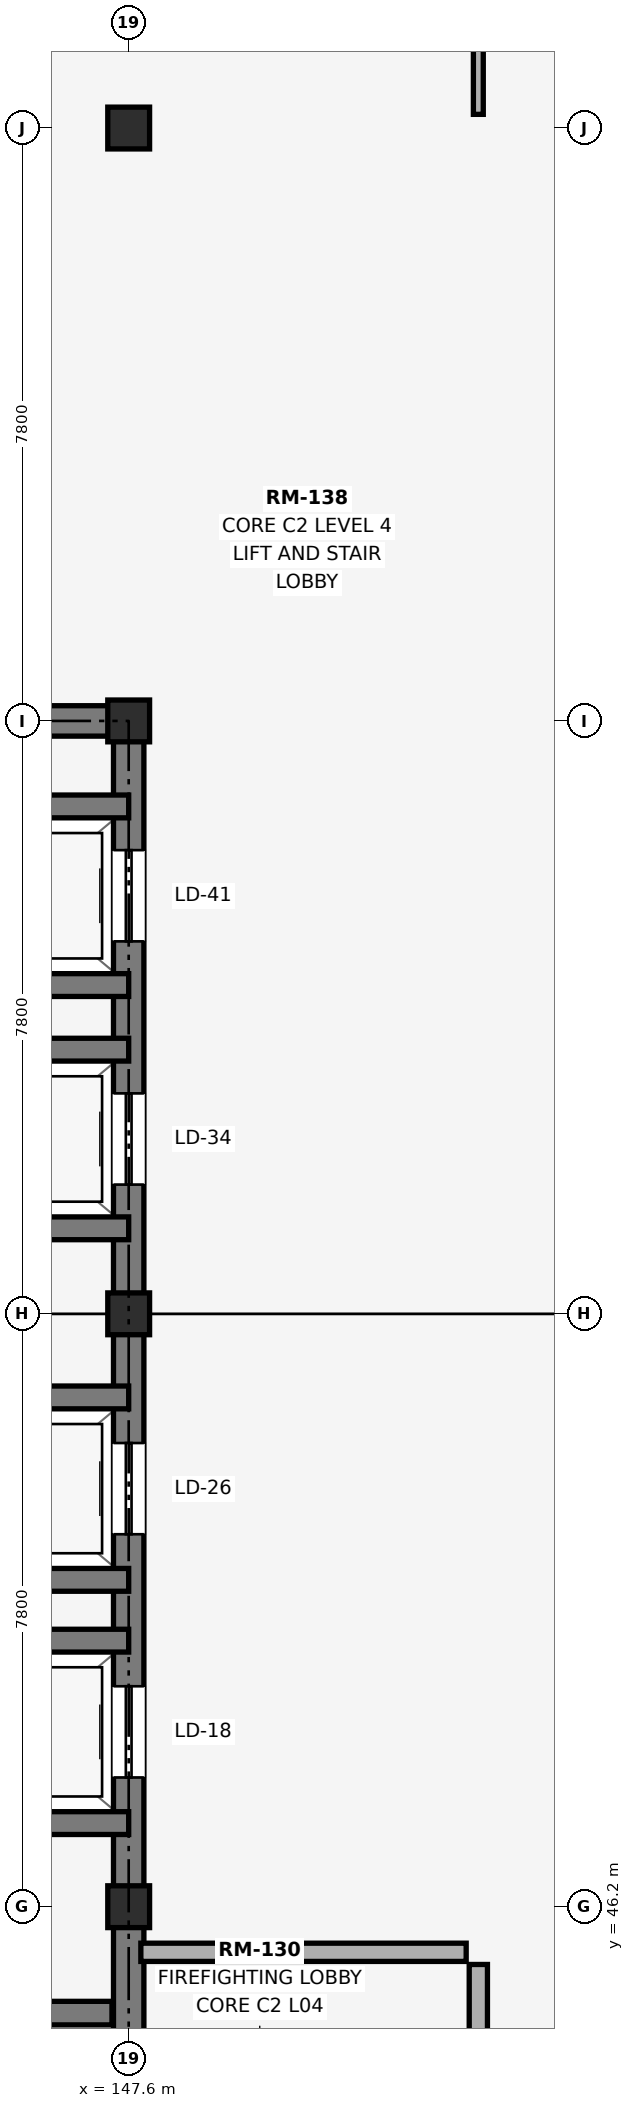
"""IFC4 building model, lengths in metres.
Left out: names, types, materials, properties, quantities, classifications, styles, units other than length and angle.
Written with IfcOpenShell. Run it as: python <this file> out.ifc"""

import sys

from ifc_helpers import new_model, si_unit, direction, frame, frame_2d, origin, origin_2d, place, context, subcontext, project, spatial, rectangle, extrude, element, fill, save


model = new_model("IFC4")
c1 = context("Model", 3, precision=1e-05, world=origin(), true_north=direction((0.0, 1.0)))
c2 = subcontext(c1, "Body", "Model", "MODEL_VIEW")
j1 = project(units=[si_unit("LENGTHUNIT", "METRE"), si_unit("PLANEANGLEUNIT", "RADIAN")], contexts=[c1])
p1 = place(None, origin())
s1 = spatial("IfcSite", under=j1, at=p1, CompositionType="ELEMENT")
p2 = place(p1, origin())
s2 = spatial("IfcBuilding", under=s1, at=p2, CompositionType="ELEMENT")
p3 = place(p2, frame((0.0, 0.0, 19.5)))
s3 = spatial("IfcBuildingStorey", under=s2, at=p3, CompositionType="ELEMENT", Elevation=19.5)
for number, where, z_axis, x_axis in (
    (1, (147.6, 46.2, 0.0), (0.0, 0.0, 1.0), (1.0, 0.0, 0.0)),
    (2, (147.6, 54.0, 0.0), (0.0, 0.0, 1.0), (1.0, 0.0, 0.0)),
    (3, (147.6, 61.8, 0.0), (0.0, 0.0, 1.0), (1.0, 0.0, 0.0)),
    (4, (147.6, 69.6, 0.0), (0.0, 0.0, 1.0), (1.0, 0.0, 0.0)),
):
    element("IfcColumn", number, at=place(p3, frame(where, z_axis=z_axis, x_axis=x_axis)), inside=s3, PredefinedType="COLUMN", context=c2, shape_type="SweptSolid", body=[
        extrude(rectangle(XDim=0.55, YDim=0.55, at=origin_2d()), origin(), (0.0, 0.0, 1.0), 4.5),
    ])
p4 = place(p3, frame((137.8, 61.8, 0.0), z_axis=(0.0, 0.0, 1.0), x_axis=(1.0, 0.0, 0.0)))
e5 = element("IfcWall", 5, at=p4, inside=s3, PredefinedType="SHEAR", context=c2, shape_type="SweptSolid", body=[
    extrude(rectangle(XDim=10.0, YDim=0.4, at=frame_2d((5.0, 0.0))), origin(), (0.0, 0.0, 1.0), 4.5),
])
p5 = place(p3, frame((147.6, 38.6, 0.0), z_axis=(0.0, 0.0, 1.0), x_axis=(0.0, 1.0, 0.0)))
e6 = element("IfcWall", 6, at=p5, inside=s3, PredefinedType="SHEAR", context=c2, shape_type="SweptSolid", body=[
    extrude(rectangle(XDim=23.0, YDim=0.4, at=frame_2d((11.5, 0.0))), origin(), (0.0, 0.0, 1.0), 4.5),
])
p6 = place(p5, frame((9.3, 0.0, 0.0)))
e7 = element("IfcOpeningElement", 7, at=p6, cuts=e6, PredefinedType="OPENING", context=c2, shape_type="SweptSolid", body=[
    extrude(rectangle(XDim=1.2, YDim=2.2, at=frame_2d((0.6, 1.1))), frame((0.0, 0.21, 0.0), z_axis=(0.0, -1.0, 0.0), x_axis=(1.0, 0.0, 0.0)), (0.0, 0.0, 1.0), 0.42),
])
p7 = place(p5, frame((12.5, 0.0, 0.0)))
e8 = element("IfcOpeningElement", 8, at=p7, cuts=e6, PredefinedType="OPENING", context=c2, shape_type="SweptSolid", body=[
    extrude(rectangle(XDim=1.2, YDim=2.2, at=frame_2d((0.6, 1.1))), frame((0.0, 0.21, 0.0), z_axis=(0.0, -1.0, 0.0), x_axis=(1.0, 0.0, 0.0)), (0.0, 0.0, 1.0), 0.42),
])
p8 = place(p5, frame((17.1, 0.0, 0.0)))
e9 = element("IfcOpeningElement", 9, at=p8, cuts=e6, PredefinedType="OPENING", context=c2, shape_type="SweptSolid", body=[
    extrude(rectangle(XDim=1.2, YDim=2.2, at=frame_2d((0.6, 1.1))), frame((0.0, 0.21, 0.0), z_axis=(0.0, -1.0, 0.0), x_axis=(1.0, 0.0, 0.0)), (0.0, 0.0, 1.0), 0.42),
])
p9 = place(p5, frame((20.3, 0.0, 0.0)))
e10 = element("IfcOpeningElement", 10, at=p9, cuts=e6, PredefinedType="OPENING", context=c2, shape_type="SweptSolid", body=[
    extrude(rectangle(XDim=1.2, YDim=2.2, at=frame_2d((0.6, 1.1))), frame((0.0, 0.21, 0.0), z_axis=(0.0, -1.0, 0.0), x_axis=(1.0, 0.0, 0.0)), (0.0, 0.0, 1.0), 0.42),
])
p10 = place(p5, frame((2.4, 0.0, 0.0)))
e11 = element("IfcOpeningElement", 11, at=p10, cuts=e6, PredefinedType="OPENING", context=c2, shape_type="SweptSolid", body=[
    extrude(rectangle(XDim=1.1, YDim=2.2, at=frame_2d((0.55, 1.1))), frame((0.0, 0.21, 0.0), z_axis=(0.0, -1.0, 0.0), x_axis=(1.0, 0.0, 0.0)), (0.0, 0.0, 1.0), 0.42),
])
p11 = place(p3, frame((138.22, 44.8, 0.0), z_axis=(0.0, 0.0, 1.0), x_axis=(1.0, 0.0, 0.0)))
e12 = element("IfcWall", 12, at=p11, inside=s3, PredefinedType="SHEAR", context=c2, shape_type="SweptSolid", body=[
    extrude(rectangle(XDim=9.16, YDim=0.31, at=frame_2d((4.58, 0.0))), origin(), (0.0, 0.0, 1.0), 4.5),
])
for number, where, z_axis, x_axis in (
    (13, (144.75, 47.3, 0.0), (0.0, 0.0, 1.0), (1.0, 0.0, 0.0)),
    (14, (144.75, 49.7, 0.0), (0.0, 0.0, 1.0), (1.0, 0.0, 0.0)),
    (15, (144.75, 50.5, 0.0), (0.0, 0.0, 1.0), (1.0, 0.0, 0.0)),
    (16, (144.75, 52.9, 0.0), (0.0, 0.0, 1.0), (1.0, 0.0, 0.0)),
):
    element("IfcWall", number, at=place(p3, frame(where, z_axis=z_axis, x_axis=x_axis)), inside=s3, PredefinedType="SHEAR", context=c2, shape_type="SweptSolid", body=[
        extrude(rectangle(XDim=2.85, YDim=0.3, at=frame_2d((1.425, 0.0))), origin(), (0.0, 0.0, 1.0), 4.5),
    ])
for number, where, z_axis, x_axis in (
    (17, (144.8, 55.125, 0.0), (0.0, 0.0, 1.0), (1.0, 0.0, 0.0)),
    (18, (144.8, 57.475, 0.0), (0.0, 0.0, 1.0), (1.0, 0.0, 0.0)),
    (19, (144.8, 58.325, 0.0), (0.0, 0.0, 1.0), (1.0, 0.0, 0.0)),
    (20, (144.8, 60.675, 0.0), (0.0, 0.0, 1.0), (1.0, 0.0, 0.0)),
):
    element("IfcWall", number, at=place(p3, frame(where, z_axis=z_axis, x_axis=x_axis)), inside=s3, PredefinedType="SHEAR", context=c2, shape_type="SweptSolid", body=[
        extrude(rectangle(XDim=2.8, YDim=0.3, at=frame_2d((1.4, 0.0))), origin(), (0.0, 0.0, 1.0), 4.5),
    ])
p12 = place(p3, frame((147.76, 45.6, 0.0), z_axis=(0.0, 0.0, 1.0), x_axis=(1.0, 0.0, 0.0)))
e21 = element("IfcWall", 21, at=p12, inside=s3, PredefinedType="PARTITIONING", context=c2, shape_type="SweptSolid", body=[
    extrude(rectangle(XDim=4.28, YDim=0.24, at=frame_2d((2.14, 0.0))), origin(), (0.0, 0.0, 1.0), 4.19),
])
p13 = place(p3, frame((152.2, 38.56, 0.0), z_axis=(0.0, 0.0, 1.0), x_axis=(0.0, 1.0, 0.0)))
e22 = element("IfcWall", 22, at=p13, inside=s3, PredefinedType="PARTITIONING", context=c2, shape_type="SweptSolid", body=[
    extrude(rectangle(XDim=6.88, YDim=0.24, at=frame_2d((3.44, 0.0))), origin(), (0.0, 0.0, 1.0), 4.19),
])
p14 = place(p13, frame((1.9, 0.0, 0.0)))
e23 = element("IfcOpeningElement", 23, at=p14, cuts=e22, PredefinedType="OPENING", context=c2, shape_type="SweptSolid", body=[
    extrude(rectangle(XDim=1.8, YDim=2.3, at=frame_2d((0.9, 1.15))), frame((0.0, 0.13, 0.0), z_axis=(0.0, -1.0, 0.0), x_axis=(1.0, 0.0, 0.0)), (0.0, 0.0, 1.0), 0.26),
])
p15 = place(p3, frame((152.2, 69.78, 0.0), z_axis=(0.0, 0.0, 1.0), x_axis=(0.0, 1.0, 0.0)))
e24 = element("IfcWall", 24, at=p15, inside=s3, PredefinedType="PARTITIONING", context=c2, shape_type="SweptSolid", body=[
    extrude(rectangle(XDim=7.49, YDim=0.13, at=frame_2d((3.745, 0.0))), origin(), (0.0, 0.0, 1.0), 4.19),
])
p16 = place(p15, frame((3.0, 0.0, 0.0)))
e25 = element("IfcOpeningElement", 25, at=p16, cuts=e24, PredefinedType="OPENING", context=c2, shape_type="SweptSolid", body=[
    extrude(rectangle(XDim=0.98, YDim=2.2, at=frame_2d((0.49, 1.1))), frame((0.0, 0.075, 0.0), z_axis=(0.0, -1.0, 0.0), x_axis=(1.0, 0.0, 0.0)), (0.0, 0.0, 1.0), 0.15),
])
p17 = place(p6, origin())
e26 = element("IfcDoor", 26, at=p17, inside=s3, OperationType="SLIDING_TO_RIGHT", PredefinedType="DOOR", context=c2, shape_type="SweptSolid", body=[
    extrude(rectangle(XDim=1.2, YDim=2.2, at=frame_2d((0.6, 1.1))), frame((0.0, 0.025, 0.0), z_axis=(0.0, -1.0, 0.0), x_axis=(1.0, 0.0, 0.0)), (0.0, 0.0, 1.0), 0.05),
])
fill(e7, e26)
p18 = place(p7, origin())
e27 = element("IfcDoor", 27, at=p18, inside=s3, OperationType="SLIDING_TO_RIGHT", PredefinedType="DOOR", context=c2, shape_type="SweptSolid", body=[
    extrude(rectangle(XDim=1.2, YDim=2.2, at=frame_2d((0.6, 1.1))), frame((0.0, 0.025, 0.0), z_axis=(0.0, -1.0, 0.0), x_axis=(1.0, 0.0, 0.0)), (0.0, 0.0, 1.0), 0.05),
])
fill(e8, e27)
p19 = place(p8, origin())
e28 = element("IfcDoor", 28, at=p19, inside=s3, OperationType="SLIDING_TO_RIGHT", PredefinedType="DOOR", context=c2, shape_type="SweptSolid", body=[
    extrude(rectangle(XDim=1.2, YDim=2.2, at=frame_2d((0.6, 1.1))), frame((0.0, 0.025, 0.0), z_axis=(0.0, -1.0, 0.0), x_axis=(1.0, 0.0, 0.0)), (0.0, 0.0, 1.0), 0.05),
])
fill(e9, e28)
p20 = place(p9, origin())
e29 = element("IfcDoor", 29, at=p20, inside=s3, OperationType="SLIDING_TO_LEFT", PredefinedType="DOOR", context=c2, shape_type="SweptSolid", body=[
    extrude(rectangle(XDim=1.2, YDim=2.2, at=frame_2d((0.6, 1.1))), frame((0.0, 0.025, 0.0), z_axis=(0.0, -1.0, 0.0), x_axis=(1.0, 0.0, 0.0)), (0.0, 0.0, 1.0), 0.05),
])
fill(e10, e29)
save(model, sys.argv[1])
